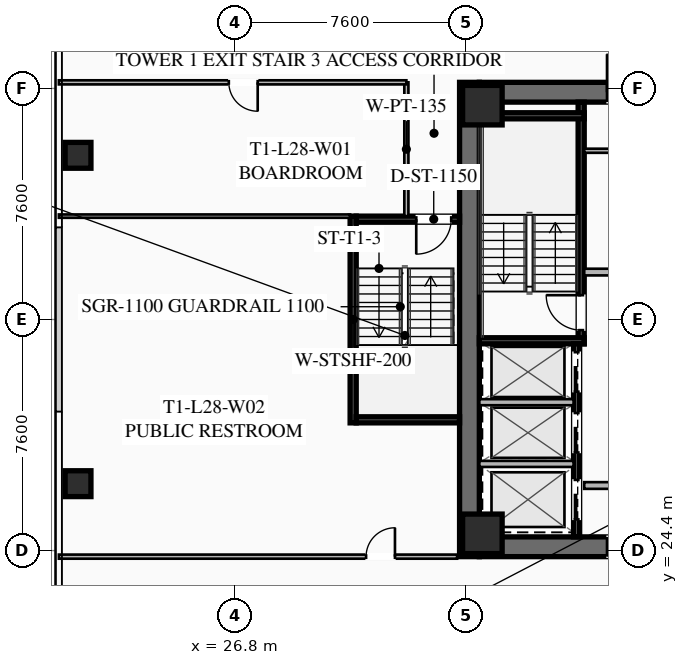
"""IFC4 building model, lengths in metres.
Left out: names, types, materials, properties, quantities, classifications, styles, units other than length and angle.
Written with IfcOpenShell. Run it as: python <this file> out.ifc"""

import sys

from ifc_helpers import new_model, si_unit, direction, frame, frame_2d, origin, origin_2d, place, context, subcontext, project, spatial, rectangle, hollow_rectangle, extrude, element, fill, save


model = new_model("IFC4")
c1 = context("Model", 3, precision=1e-05, world=origin(), true_north=direction((0.0, 1.0)))
c2 = subcontext(c1, "Body", "Model", "MODEL_VIEW")
j1 = project(units=[si_unit("LENGTHUNIT", "METRE"), si_unit("PLANEANGLEUNIT", "RADIAN")], contexts=[c1])
p1 = place(None, origin())
s1 = spatial("IfcSite", under=j1, at=p1, CompositionType="ELEMENT")
p2 = place(p1, origin())
s2 = spatial("IfcBuilding", under=s1, at=p2, CompositionType="ELEMENT")
p3 = place(p2, frame((0.0, 0.0, 106.25)))
s3 = spatial("IfcBuildingStorey", under=s2, at=p3, CompositionType="ELEMENT", Elevation=106.25)
p4 = place(p3, frame((34.525, 24.2, 0.0), z_axis=(0.0, 0.0, 1.0), x_axis=(0.0, 1.0, 0.0)))
e1 = element("IfcWall", 1, at=p4, inside=s3, PredefinedType="SHEAR", context=c2, shape_type="SweptSolid", body=[
    extrude(rectangle(XDim=15.6, YDim=0.65, at=frame_2d((7.8, 0.0))), origin(), (0.0, 0.0, 1.0), 3.55),
])
p5 = place(p3, frame((49.15, 24.525, 0.0), z_axis=(0.0, 0.0, 1.0), x_axis=(-1.0, 0.0, 0.0)))
e2 = element("IfcWall", 2, at=p5, inside=s3, PredefinedType="SHEAR", context=c2, shape_type="SweptSolid", body=[
    extrude(rectangle(XDim=14.3, YDim=0.65, at=frame_2d((7.15, 0.0))), origin(), (0.0, 0.0, 1.0), 3.55),
])
p6 = place(p5, frame((8.85, 0.0, 0.0)))
e3 = element("IfcOpeningElement", 3, at=p6, cuts=e2, PredefinedType="OPENING", context=c2, shape_type="SweptSolid", body=[
    extrude(rectangle(XDim=1.25, YDim=2.25, at=frame_2d((0.625, 1.125))), frame((0.0, 0.335, 0.0), z_axis=(0.0, -1.0, 0.0), x_axis=(1.0, 0.0, 0.0)), (0.0, 0.0, 1.0), 0.67),
])
p7 = place(p5, frame((3.8, 0.0, 0.0)))
e4 = element("IfcOpeningElement", 4, at=p7, cuts=e2, PredefinedType="OPENING", context=c2, shape_type="SweptSolid", body=[
    extrude(rectangle(XDim=1.25, YDim=2.25, at=frame_2d((0.625, 1.125))), frame((0.0, 0.335, 0.0), z_axis=(0.0, -1.0, 0.0), x_axis=(1.0, 0.0, 0.0)), (0.0, 0.0, 1.0), 0.67),
])
p8 = place(p3, frame((34.85, 39.475, 0.0), z_axis=(0.0, 0.0, 1.0), x_axis=(1.0, 0.0, 0.0)))
e5 = element("IfcWall", 5, at=p8, inside=s3, PredefinedType="SHEAR", context=c2, shape_type="SweptSolid", body=[
    extrude(rectangle(XDim=14.3, YDim=0.65, at=frame_2d((7.15, 0.0))), origin(), (0.0, 0.0, 1.0), 3.55),
])
p9 = place(p8, frame((4.2, 0.0, 0.0)))
e6 = element("IfcOpeningElement", 6, at=p9, cuts=e5, PredefinedType="OPENING", context=c2, shape_type="SweptSolid", body=[
    extrude(rectangle(XDim=1.25, YDim=2.25, at=frame_2d((0.625, 1.125))), frame((0.0, 0.335, 0.0), z_axis=(0.0, -1.0, 0.0), x_axis=(1.0, 0.0, 0.0)), (0.0, 0.0, 1.0), 0.67),
])
p10 = place(p8, frame((9.25, 0.0, 0.0)))
e7 = element("IfcOpeningElement", 7, at=p10, cuts=e5, PredefinedType="OPENING", context=c2, shape_type="SweptSolid", body=[
    extrude(rectangle(XDim=1.25, YDim=2.25, at=frame_2d((0.625, 1.125))), frame((0.0, 0.335, 0.0), z_axis=(0.0, -1.0, 0.0), x_axis=(1.0, 0.0, 0.0)), (0.0, 0.0, 1.0), 0.67),
])
for number, where, z_axis, x_axis in (
    (8, (34.95, 24.95, 0.0), (0.0, 0.0, 1.0), (1.0, 0.0, 0.0)),
    (9, (34.95, 39.05, 0.0), (0.0, 0.0, 1.0), (1.0, 0.0, 0.0)),
):
    element("IfcColumn", number, at=place(p3, frame(where, z_axis=z_axis, x_axis=x_axis)), inside=s3, PredefinedType="COLUMN", context=c2, shape_type="SweptSolid", body=[
        extrude(hollow_rectangle(XDim=1.3, YDim=1.3, WallThickness=0.05, at=origin_2d()), origin(), (0.0, 0.0, 1.0), 3.25),
    ])
for number, where, z_axis, x_axis in (
    (10, (21.65, 37.4, 0.0), (0.0, 0.0, 1.0), (1.0, 0.0, 0.0)),
    (11, (21.65, 26.6, 0.0), (0.0, 0.0, 1.0), (1.0, 0.0, 0.0)),
):
    element("IfcColumn", number, at=place(p3, frame(where, z_axis=z_axis, x_axis=x_axis)), inside=s3, PredefinedType="COLUMN", context=c2, shape_type="SweptSolid", body=[
        extrude(hollow_rectangle(XDim=0.85, YDim=0.85, WallThickness=0.035, at=origin_2d()), origin(), (0.0, 0.0, 1.0), 3.25),
    ])
p11 = place(p3, frame((38.2, 31.2, 0.0), z_axis=(0.0, 0.0, 1.0), x_axis=(0.0, 1.0, 0.0)))
e12 = element("IfcWall", 12, at=p11, inside=s3, PredefinedType="SHEAR", context=c2, shape_type="SweptSolid", body=[
    extrude(rectangle(XDim=7.95, YDim=0.2, at=frame_2d((3.975, 0.0))), origin(), (0.0, 0.0, 1.0), 3.25),
])
p12 = place(p11, frame((0.45, 0.0, 0.0)))
e13 = element("IfcOpeningElement", 13, at=p12, cuts=e12, PredefinedType="OPENING", context=c2, shape_type="SweptSolid", body=[
    extrude(rectangle(XDim=1.15, YDim=2.2, at=frame_2d((0.575, 1.1))), frame((0.0, 0.11, 0.0), z_axis=(0.0, -1.0, 0.0), x_axis=(1.0, 0.0, 0.0)), (0.0, 0.0, 1.0), 0.22),
])
for number, where, z_axis, x_axis in (
    (14, (34.85, 31.3, 0.0), (0.0, 0.0, 1.0), (1.0, 0.0, 0.0)),
    (15, (34.85, 38.7, 0.0), (0.0, 0.0, 1.0), (1.0, 0.0, 0.0)),
):
    element("IfcWall", number, at=place(p3, frame(where, z_axis=z_axis, x_axis=x_axis)), inside=s3, PredefinedType="SHEAR", context=c2, shape_type="SweptSolid", body=[
        extrude(rectangle(XDim=3.45, YDim=0.2, at=frame_2d((1.725, 0.0))), origin(), (0.0, 0.0, 1.0), 3.25),
    ])
p13 = place(p3, frame((38.3, 33.56, 0.0), z_axis=(0.0, 0.0, 1.0), x_axis=(1.0, 0.0, 0.0)))
e16 = element("IfcWall", 16, at=p13, inside=s3, PredefinedType="SOLIDWALL", context=c2, shape_type="SweptSolid", body=[
    extrude(rectangle(XDim=3.15, YDim=0.22, at=frame_2d((1.575, 0.0))), origin(), (0.0, 0.0, 1.0), 2.393),
])
p14 = place(p3, frame((38.3, 26.54, 0.0), z_axis=(0.0, 0.0, 1.0), x_axis=(1.0, 0.0, 0.0)))
e17 = element("IfcWall", 17, at=p14, inside=s3, PredefinedType="SOLIDWALL", context=c2, shape_type="SweptSolid", body=[
    extrude(rectangle(XDim=3.15, YDim=0.22, at=frame_2d((1.575, 0.0))), origin(), (0.0, 0.0, 1.0), 2.393),
])
p15 = place(p14, frame((0.95, 0.0, 0.0)))
e18 = element("IfcOpeningElement", 18, at=p15, cuts=e17, PredefinedType="OPENING", context=c2, shape_type="SweptSolid", body=[
    extrude(rectangle(XDim=1.25, YDim=2.25, at=frame_2d((0.625, 1.125))), frame((0.0, 0.12, 0.0), z_axis=(0.0, -1.0, 0.0), x_axis=(1.0, 0.0, 0.0)), (0.0, 0.0, 1.0), 0.24),
])
p16 = place(p3, frame((38.05, 24.85, 0.0), z_axis=(0.0, 0.0, 1.0), x_axis=(0.0, 1.0, 0.0)))
e19 = element("IfcWall", 19, at=p16, inside=s3, PredefinedType="SHEAR", context=c2, shape_type="SweptSolid", body=[
    extrude(rectangle(XDim=6.35, YDim=0.2, at=frame_2d((3.175, 0.0))), origin(), (0.0, 0.0, 1.0), 3.25),
])
p17 = place(p16, frame((4.775, 0.0, 0.0)))
e20 = element("IfcOpeningElement", 20, at=p17, cuts=e19, PredefinedType="OPENING", context=c2, shape_type="SweptSolid", body=[
    extrude(rectangle(XDim=1.3, YDim=2.25, at=frame_2d((0.65, 1.125))), frame((0.0, 0.11, 0.0), z_axis=(0.0, -1.0, 0.0), x_axis=(1.0, 0.0, 0.0)), (0.0, 0.0, 1.0), 0.22),
])
p18 = place(p16, frame((2.775, 0.0, 0.0)))
e21 = element("IfcOpeningElement", 21, at=p18, cuts=e19, PredefinedType="OPENING", context=c2, shape_type="SweptSolid", body=[
    extrude(rectangle(XDim=1.3, YDim=2.25, at=frame_2d((0.65, 1.125))), frame((0.0, 0.11, 0.0), z_axis=(0.0, -1.0, 0.0), x_axis=(1.0, 0.0, 0.0)), (0.0, 0.0, 1.0), 0.22),
])
p19 = place(p16, frame((0.575, 0.0, 0.0)))
e22 = element("IfcOpeningElement", 22, at=p19, cuts=e19, PredefinedType="OPENING", context=c2, shape_type="SweptSolid", body=[
    extrude(rectangle(XDim=1.3, YDim=2.25, at=frame_2d((0.65, 1.125))), frame((0.0, 0.11, 0.0), z_axis=(0.0, -1.0, 0.0), x_axis=(1.0, 0.0, 0.0)), (0.0, 0.0, 1.0), 0.22),
])
for number, where, z_axis, x_axis in (
    (23, (34.85, 27.25, 0.0), (0.0, 0.0, 1.0), (1.0, 0.0, 0.0)),
    (24, (34.85, 29.28, 0.0), (0.0, 0.0, 1.0), (1.0, 0.0, 0.0)),
):
    element("IfcWall", number, at=place(p3, frame(where, z_axis=z_axis, x_axis=x_axis)), inside=s3, PredefinedType="SOLIDWALL", context=c2, shape_type="SweptSolid", body=[
        extrude(rectangle(XDim=3.1, YDim=0.2, at=frame_2d((1.55, 0.0))), origin(), (0.0, 0.0, 1.0), 3.25),
    ])
p20 = place(p3, frame((38.3, 37.55, 0.0), z_axis=(0.0, 0.0, 1.0), x_axis=(1.0, 0.0, 0.0)))
e25 = element("IfcWall", 25, at=p20, inside=s3, PredefinedType="PARTITIONING", context=c2, shape_type="SweptSolid", body=[
    extrude(rectangle(XDim=3.15, YDim=0.135, at=frame_2d((1.575, 0.0))), origin(), (0.0, 0.0, 1.0), 2.393),
])
p21 = place(p20, frame((1.05, 0.0, 0.0)))
e26 = element("IfcOpeningElement", 26, at=p21, cuts=e25, PredefinedType="OPENING", context=c2, shape_type="SweptSolid", body=[
    extrude(rectangle(XDim=1.05, YDim=2.2, at=frame_2d((0.525, 1.1))), frame((0.0, 0.077, 0.0), z_axis=(0.0, -1.0, 0.0), x_axis=(1.0, 0.0, 0.0)), (0.0, 0.0, 1.0), 0.155),
])
p22 = place(p3, frame((30.7, 28.6, 0.0), z_axis=(0.0, 0.0, 1.0), x_axis=(0.0, 1.0, 0.0)))
e27 = element("IfcWall", 27, at=p22, inside=s3, PredefinedType="SHEAR", context=c2, shape_type="SweptSolid", body=[
    extrude(rectangle(XDim=6.8, YDim=0.2, at=frame_2d((3.4, 0.0))), origin(), (0.0, 0.0, 1.0), 3.25),
])
p23 = place(p3, frame((34.2, 35.3, 0.0), z_axis=(0.0, 0.0, 1.0), x_axis=(-1.0, 0.0, 0.0)))
e28 = element("IfcWall", 28, at=p23, inside=s3, PredefinedType="SHEAR", context=c2, shape_type="SweptSolid", body=[
    extrude(rectangle(XDim=3.4, YDim=0.2, at=frame_2d((1.7, 0.0))), origin(), (0.0, 0.0, 1.0), 3.25),
])
p24 = place(p23, frame((0.275, 0.0, 0.0)))
e29 = element("IfcOpeningElement", 29, at=p24, cuts=e28, PredefinedType="OPENING", context=c2, shape_type="SweptSolid", body=[
    extrude(rectangle(XDim=1.15, YDim=2.2, at=frame_2d((0.575, 1.1))), frame((0.0, 0.11, 0.0), z_axis=(0.0, -1.0, 0.0), x_axis=(1.0, 0.0, 0.0)), (0.0, 0.0, 1.0), 0.22),
])
p25 = place(p3, frame((30.8, 28.7, 0.0), z_axis=(0.0, 0.0, 1.0), x_axis=(1.0, 0.0, 0.0)))
e30 = element("IfcWall", 30, at=p25, inside=s3, PredefinedType="SHEAR", context=c2, shape_type="SweptSolid", body=[
    extrude(rectangle(XDim=3.4, YDim=0.2, at=frame_2d((1.7, 0.0))), origin(), (0.0, 0.0, 1.0), 3.25),
])
p26 = place(p3, frame((32.45, 35.4, 0.0), z_axis=(0.0, 0.0, 1.0), x_axis=(0.0, 1.0, 0.0)))
e31 = element("IfcWall", 31, at=p26, inside=s3, PredefinedType="PARTITIONING", context=c2, shape_type="SweptSolid", body=[
    extrude(rectangle(XDim=4.4, YDim=0.135, at=frame_2d((2.2, 0.0))), origin(), (0.0, 0.0, 1.0), 2.393),
])
p27 = place(p3, frame((32.45, 39.8, 0.0), z_axis=(0.0, 0.0, 1.0), x_axis=(-1.0, 0.0, 0.0)))
e32 = element("IfcWall", 32, at=p27, inside=s3, PredefinedType="PARTITIONING", context=c2, shape_type="SweptSolid", body=[
    extrude(rectangle(XDim=11.43, YDim=0.135, at=frame_2d((5.715, 0.0))), origin(), (0.0, 0.0, 1.0), 2.393),
])
p28 = place(p27, frame((4.89, 0.0, 0.0)))
e33 = element("IfcOpeningElement", 33, at=p28, cuts=e32, PredefinedType="OPENING", context=c2, shape_type="SweptSolid", body=[
    extrude(rectangle(XDim=0.95, YDim=2.05, at=frame_2d((0.475, 1.025))), frame((0.0, 0.077, 0.0), z_axis=(0.0, -1.0, 0.0), x_axis=(1.0, 0.0, 0.0)), (0.0, 0.0, 1.0), 0.155),
])
p29 = place(p3, frame((21.02, 24.2, 0.0), z_axis=(0.0, 0.0, 1.0), x_axis=(1.0, 0.0, 0.0)))
e34 = element("IfcWall", 34, at=p29, inside=s3, PredefinedType="PARTITIONING", context=c2, shape_type="SweptSolid", body=[
    extrude(rectangle(XDim=13.1, YDim=0.135, at=frame_2d((6.55, 0.0))), origin(), (0.0, 0.0, 1.0), 2.393),
])
p30 = place(p29, frame((10.105, 0.0, 0.0)))
e35 = element("IfcOpeningElement", 35, at=p30, cuts=e34, PredefinedType="OPENING", context=c2, shape_type="SweptSolid", body=[
    extrude(rectangle(XDim=0.95, YDim=2.05, at=frame_2d((0.475, 1.025))), frame((0.0, 0.077, 0.0), z_axis=(0.0, -1.0, 0.0), x_axis=(1.0, 0.0, 0.0)), (0.0, 0.0, 1.0), 0.155),
])
p31 = place(p3, frame((30.6, 35.4, 0.0), z_axis=(0.0, 0.0, 1.0), x_axis=(-1.0, 0.0, 0.0)))
e36 = element("IfcWall", 36, at=p31, inside=s3, PredefinedType="PARTITIONING", context=c2, shape_type="SweptSolid", body=[
    extrude(rectangle(XDim=9.58, YDim=0.11, at=frame_2d((4.79, 0.0))), origin(), (0.0, 0.0, 1.0), 2.393),
])
p32 = place(p9, origin())
e37 = element("IfcDoor", 37, at=p32, inside=s3, OperationType="SINGLE_SWING_LEFT", PredefinedType="DOOR", context=c2, shape_type="SweptSolid", body=[
    extrude(rectangle(XDim=1.25, YDim=2.25, at=frame_2d((0.625, 1.125))), frame((0.0, 0.025, 0.0), z_axis=(0.0, -1.0, 0.0), x_axis=(1.0, 0.0, 0.0)), (0.0, 0.0, 1.0), 0.05),
])
fill(e6, e37)
p33 = place(p6, origin())
e38 = element("IfcDoor", 38, at=p33, inside=s3, OperationType="SINGLE_SWING_LEFT", PredefinedType="DOOR", context=c2, shape_type="SweptSolid", body=[
    extrude(rectangle(XDim=1.25, YDim=2.25, at=frame_2d((0.625, 1.125))), frame((0.0, 0.025, 0.0), z_axis=(0.0, -1.0, 0.0), x_axis=(1.0, 0.0, 0.0)), (0.0, 0.0, 1.0), 0.05),
])
fill(e3, e38)
p34 = place(p12, origin())
e39 = element("IfcDoor", 39, at=p34, inside=s3, OperationType="SINGLE_SWING_RIGHT", PredefinedType="DOOR", context=c2, shape_type="SweptSolid", body=[
    extrude(rectangle(XDim=1.15, YDim=2.2, at=frame_2d((0.575, 1.1))), frame((0.0, 0.025, 0.0), z_axis=(0.0, -1.0, 0.0), x_axis=(1.0, 0.0, 0.0)), (0.0, 0.0, 1.0), 0.05),
])
fill(e13, e39)
p35 = place(p24, origin())
e40 = element("IfcDoor", 40, at=p35, inside=s3, OperationType="SINGLE_SWING_RIGHT", PredefinedType="DOOR", context=c2, shape_type="SweptSolid", body=[
    extrude(rectangle(XDim=1.15, YDim=2.2, at=frame_2d((0.575, 1.1))), frame((0.0, 0.025, 0.0), z_axis=(0.0, -1.0, 0.0), x_axis=(1.0, 0.0, 0.0)), (0.0, 0.0, 1.0), 0.05),
])
fill(e29, e40)
p36 = place(p28, origin())
e41 = element("IfcDoor", 41, at=p36, inside=s3, OperationType="SINGLE_SWING_LEFT", PredefinedType="DOOR", context=c2, shape_type="SweptSolid", body=[
    extrude(rectangle(XDim=0.95, YDim=2.05, at=frame_2d((0.475, 1.025))), frame((0.0, 0.025, 0.0), z_axis=(0.0, -1.0, 0.0), x_axis=(1.0, 0.0, 0.0)), (0.0, 0.0, 1.0), 0.05),
])
fill(e33, e41)
p37 = place(p30, origin())
e42 = element("IfcDoor", 42, at=p37, inside=s3, OperationType="SINGLE_SWING_RIGHT", PredefinedType="DOOR", context=c2, shape_type="SweptSolid", body=[
    extrude(rectangle(XDim=0.95, YDim=2.05, at=frame_2d((0.475, 1.025))), frame((0.0, 0.025, 0.0), z_axis=(0.0, -1.0, 0.0), x_axis=(1.0, 0.0, 0.0)), (0.0, 0.0, 1.0), 0.05),
])
fill(e35, e42)
p38 = place(p17, origin())
e43 = element("IfcDoor", 43, at=p38, inside=s3, OperationType="SLIDING_TO_LEFT", PredefinedType="DOOR", context=c2, shape_type="SweptSolid", body=[
    extrude(rectangle(XDim=1.3, YDim=2.25, at=frame_2d((0.65, 1.125))), frame((0.0, 0.025, 0.0), z_axis=(0.0, -1.0, 0.0), x_axis=(1.0, 0.0, 0.0)), (0.0, 0.0, 1.0), 0.05),
])
fill(e20, e43)
p39 = place(p18, origin())
e44 = element("IfcDoor", 44, at=p39, inside=s3, OperationType="SLIDING_TO_LEFT", PredefinedType="DOOR", context=c2, shape_type="SweptSolid", body=[
    extrude(rectangle(XDim=1.3, YDim=2.25, at=frame_2d((0.65, 1.125))), frame((0.0, 0.025, 0.0), z_axis=(0.0, -1.0, 0.0), x_axis=(1.0, 0.0, 0.0)), (0.0, 0.0, 1.0), 0.05),
])
fill(e21, e44)
p40 = place(p19, origin())
e45 = element("IfcDoor", 45, at=p40, inside=s3, OperationType="SLIDING_TO_LEFT", PredefinedType="DOOR", context=c2, shape_type="SweptSolid", body=[
    extrude(rectangle(XDim=1.3, YDim=2.25, at=frame_2d((0.65, 1.125))), frame((0.0, 0.025, 0.0), z_axis=(0.0, -1.0, 0.0), x_axis=(1.0, 0.0, 0.0)), (0.0, 0.0, 1.0), 0.05),
])
fill(e22, e45)
save(model, sys.argv[1])
